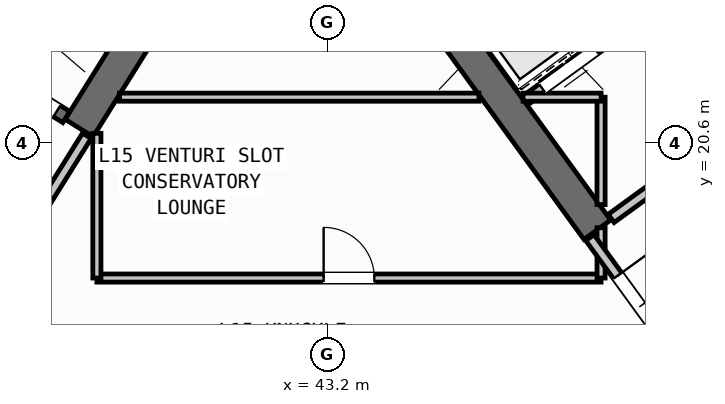
"""IFC4 building model, lengths in metres.
Left out: names, types, materials, properties, quantities, classifications, styles, units other than length and angle.
Written with IfcOpenShell. Run it as: python <this file> out.ifc"""

import sys

from ifc_helpers import new_model, si_unit, direction, frame, frame_2d, origin, place, context, subcontext, project, spatial, rectangle, extrude, source, transform, mapped, element, fill, save


model = new_model("IFC4")
c1 = context("Model", 3, precision=1e-05, world=origin(), true_north=direction((0.0, 1.0)))
c2 = subcontext(c1, "Body", "Model", "MODEL_VIEW")
j1 = project(units=[si_unit("LENGTHUNIT", "METRE"), si_unit("PLANEANGLEUNIT", "RADIAN")], contexts=[c1])
p1 = place(None, origin())
s1 = spatial("IfcSite", under=j1, at=p1, CompositionType="ELEMENT")
p2 = place(p1, origin())
s2 = spatial("IfcBuilding", under=s1, at=p2, CompositionType="ELEMENT")
p3 = place(p2, frame((0.0, 0.0, 60.0)))
s3 = spatial("IfcBuildingStorey", under=s2, at=p3, CompositionType="ELEMENT", Elevation=60.0)
p4 = place(p3, frame((40.168, 23.88, 0.0), z_axis=(0.0, 0.0, 1.0), x_axis=(-0.529893103397, -0.8480644427, 0.0)))
e1 = element("IfcWall", 1, at=p4, inside=s3, PredefinedType="SHEAR", context=c2, shape_type="SweptSolid", body=[
    extrude(rectangle(XDim=3.525, YDim=0.65, at=frame_2d((1.763, 0.0))), origin(), (0.0, 0.0, 1.0), 3.35),
])
p5 = place(p3, frame((48.526, 18.884, 0.0), z_axis=(0.0, 0.0, 1.0), x_axis=(-0.58777996584, 0.809020835181, 0.0)))
e2 = element("IfcWall", 2, at=p5, inside=s3, PredefinedType="SHEAR", context=c2, shape_type="SweptSolid", body=[
    extrude(rectangle(XDim=6.375, YDim=0.65, at=frame_2d((3.188, 0.0))), origin(), (0.0, 0.0, 1.0), 3.35),
])
p6 = place(p3, frame((38.046, 21.108, 0.0), z_axis=(0.0, 0.0, 1.0), x_axis=(-0.848054434086, 0.529909121291, 0.0)))
e3 = element("IfcWall", 3, at=p6, inside=s3, PredefinedType="SHEAR", context=c2, shape_type="SweptSolid", body=[
    extrude(rectangle(XDim=7.33, YDim=0.26, at=frame_2d((3.665, 0.0))), origin(), (0.0, 0.0, 1.0), 3.35),
])
p7 = place(p6, frame((0.22, 0.0, 0.0)))
e4 = element("IfcOpeningElement", 4, at=p7, cuts=e3, PredefinedType="OPENING", context=c2, shape_type="SweptSolid", body=[
    extrude(rectangle(XDim=1.1, YDim=2.1, at=frame_2d((0.55, 1.05))), frame((0.0, 0.14, 0.0), z_axis=(0.0, -1.0, 0.0), x_axis=(1.0, 0.0, 0.0)), (0.0, 0.0, 1.0), 0.28),
])
p8 = place(p3, frame((47.106, 21.437, 0.0), z_axis=(0.0, 0.0, 1.0), x_axis=(0.809012514015, 0.58779141893, 0.0)))
e5 = element("IfcWall", 5, at=p8, inside=s3, PredefinedType="STANDARD", context=c2, shape_type="SweptSolid", body=[
    extrude(rectangle(XDim=3.398, YDim=0.2, at=frame_2d((1.699, 0.0))), origin(), (0.0, 0.0, 1.0), 3.34),
])
p9 = place(p8, frame((0.408, 0.0, 0.0)))
e6 = element("IfcOpeningElement", 6, at=p9, cuts=e5, PredefinedType="OPENING", context=c2, shape_type="SweptSolid", body=[
    extrude(rectangle(XDim=1.3, YDim=2.2, at=frame_2d((0.65, 1.1))), frame((0.0, 0.11, 0.0), z_axis=(0.0, -1.0, 0.0), x_axis=(1.0, 0.0, 0.0)), (0.0, 0.0, 1.0), 0.22),
])
p10 = place(p3, frame((48.799, 19.107, 0.0), z_axis=(0.0, 0.0, 1.0), x_axis=(0.809012959416, 0.587790805897, 0.0)))
e7 = element("IfcWall", 7, at=p10, inside=s3, PredefinedType="STANDARD", context=c2, shape_type="SweptSolid", body=[
    extrude(rectangle(XDim=5.718, YDim=0.2, at=frame_2d((2.859, 0.0))), origin(), (0.0, 0.0, 1.0), 3.34),
])
p11 = place(p10, frame((2.498, 0.0, 0.0)))
e8 = element("IfcOpeningElement", 8, at=p11, cuts=e7, PredefinedType="OPENING", context=c2, shape_type="SweptSolid", body=[
    extrude(rectangle(XDim=1.15, YDim=2.1, at=frame_2d((0.575, 1.05))), frame((0.0, 0.11, 0.0), z_axis=(0.0, -1.0, 0.0), x_axis=(1.0, 0.0, 0.0)), (0.0, 0.0, 1.0), 0.22),
])
p12 = place(p3, frame((38.451, 20.737, 0.0), z_axis=(0.0, 0.0, 1.0), x_axis=(-0.529924799939, -0.848044637038, 0.0)))
e9 = element("IfcWall", 9, at=p12, inside=s3, PredefinedType="STANDARD", context=c2, shape_type="SweptSolid", body=[
    extrude(rectangle(XDim=2.96, YDim=0.2, at=frame_2d((1.48, 0.0))), origin(), (0.0, 0.0, 1.0), 3.34),
])
p13 = place(p12, frame((1.46, 0.0, 0.0)))
e10 = element("IfcOpeningElement", 10, at=p13, cuts=e9, PredefinedType="OPENING", context=c2, shape_type="SweptSolid", body=[
    extrude(rectangle(XDim=0.86, YDim=2.05, at=frame_2d((0.43, 1.025))), frame((0.0, 0.11, 0.0), z_axis=(0.0, -1.0, 0.0), x_axis=(1.0, 0.0, 0.0)), (0.0, 0.0, 1.0), 0.22),
])
p14 = place(p3, frame((38.65, 17.93, 0.0), z_axis=(0.0, 0.0, 1.0), x_axis=(1.0, 0.0, 0.0)))
e11 = element("IfcWall", 11, at=p14, inside=s3, PredefinedType="PARTITIONING", context=c2, shape_type="SweptSolid", body=[
    extrude(rectangle(XDim=9.95, YDim=0.16, at=frame_2d((4.975, 0.0))), origin(), (0.0, 0.0, 1.0), 3.34),
])
p15 = place(p14, frame((4.475, 0.0, 0.0)))
e12 = element("IfcOpeningElement", 12, at=p15, cuts=e11, PredefinedType="OPENING", context=c2, shape_type="SweptSolid", body=[
    extrude(rectangle(XDim=1.0, YDim=2.1, at=frame_2d((0.5, 1.05))), frame((0.0, 0.09, 0.0), z_axis=(0.0, -1.0, 0.0), x_axis=(1.0, 0.0, 0.0)), (0.0, 0.0, 1.0), 0.18),
])
p16 = place(p3, frame((38.65, 17.93, 0.0), z_axis=(0.0, 0.0, 1.0), x_axis=(0.0, 1.0, 0.0)))
e13 = element("IfcWall", 13, at=p16, inside=s3, PredefinedType="PARTITIONING", context=c2, shape_type="SweptSolid", body=[
    extrude(rectangle(XDim=2.857, YDim=0.16, at=frame_2d((1.428, 0.0))), origin(), (0.0, 0.0, 1.0), 3.34),
])
p17 = place(p3, frame((48.6, 17.93, 0.0), z_axis=(0.0, 0.0, 1.0), x_axis=(0.0, 1.0, 0.0)))
e14 = element("IfcWall", 14, at=p17, inside=s3, PredefinedType="PARTITIONING", context=c2, shape_type="SweptSolid", body=[
    extrude(rectangle(XDim=0.993, YDim=0.16, at=frame_2d((0.496, 0.0))), origin(), (0.0, 0.0, 1.0), 3.34),
])
p18 = place(p3, frame((48.6, 19.38, 0.0), z_axis=(0.0, 0.0, 1.0), x_axis=(0.0, 1.0, 0.0)))
e15 = element("IfcWall", 15, at=p18, inside=s3, PredefinedType="PARTITIONING", context=c2, shape_type="SweptSolid", body=[
    extrude(rectangle(XDim=2.12, YDim=0.16, at=frame_2d((1.06, 0.0))), origin(), (0.0, 0.0, 1.0), 3.34),
])
p19 = place(p3, frame((39.095, 21.5, 0.0), z_axis=(0.0, 0.0, 1.0), x_axis=(1.0, 0.0, 0.0)))
e16 = element("IfcWall", 16, at=p19, inside=s3, PredefinedType="PARTITIONING", context=c2, shape_type="SweptSolid", body=[
    extrude(rectangle(XDim=7.094, YDim=0.16, at=frame_2d((3.547, 0.0))), origin(), (0.0, 0.0, 1.0), 3.34),
])
p20 = place(p3, frame((47.06, 21.5, 0.0), z_axis=(0.0, 0.0, 1.0), x_axis=(1.0, 0.0, 0.0)))
e17 = element("IfcWall", 17, at=p20, inside=s3, PredefinedType="PARTITIONING", context=c2, shape_type="SweptSolid", body=[
    extrude(rectangle(XDim=1.54, YDim=0.16, at=frame_2d((0.77, 0.0))), origin(), (0.0, 0.0, 1.0), 3.34),
])
p21 = place(p3, frame((50.119, 16.333, 0.0), z_axis=(0.0, 0.0, 1.0), x_axis=(-0.587749856981, 0.809042709391, 0.0)))
e18 = element("IfcWall", 18, at=p21, inside=s3, PredefinedType="STANDARD", context=c2, shape_type="SweptSolid", body=[
    extrude(rectangle(XDim=2.96, YDim=0.2, at=frame_2d((1.48, 0.0))), origin(), (0.0, 0.0, 1.0), 3.34),
])
p22 = place(p21, frame((0.53, 0.0, 0.0)))
e19 = element("IfcOpeningElement", 19, at=p22, cuts=e18, PredefinedType="OPENING", context=c2, shape_type="SweptSolid", body=[
    extrude(rectangle(XDim=1.5, YDim=2.15, at=frame_2d((0.75, 1.075))), frame((0.0, 0.11, 0.0), z_axis=(0.0, -1.0, 0.0), x_axis=(1.0, 0.0, 0.0)), (0.0, 0.0, 1.0), 0.22),
])
m1 = source(origin(), c2, "Body", "SweptSolid", [
    extrude(rectangle(XDim=1.1, YDim=2.1, at=frame_2d((0.55, 1.05))), frame((0.0, 0.025, 0.0), z_axis=(0.0, -1.0, 0.0), x_axis=(1.0, 0.0, 0.0)), (0.0, 0.0, 1.0), 0.05),
])
p23 = place(p7, origin())
e20 = element("IfcDoor", 20, at=p23, inside=s3, OperationType="SINGLE_SWING_RIGHT", PredefinedType="DOOR", context=c2, shape_type="MappedRepresentation", body=[
    mapped(m1, transform((0.0, 0.0, 0.0), scale=1.0)),
])
fill(e4, e20)
m2 = source(origin(), c2, "Body", "SweptSolid", [
    extrude(rectangle(XDim=1.3, YDim=2.2, at=frame_2d((0.65, 1.1))), frame((0.0, 0.025, 0.0), z_axis=(0.0, -1.0, 0.0), x_axis=(1.0, 0.0, 0.0)), (0.0, 0.0, 1.0), 0.05),
])
p24 = place(p9, origin())
e21 = element("IfcDoor", 21, at=p24, inside=s3, OperationType="DOUBLE_DOOR_SLIDING", PredefinedType="DOOR", context=c2, shape_type="MappedRepresentation", body=[
    mapped(m2, transform((0.0, 0.0, 0.0), scale=1.0)),
])
fill(e6, e21)
m3 = source(origin(), c2, "Body", "SweptSolid", [
    extrude(rectangle(XDim=1.0, YDim=2.1, at=frame_2d((0.5, 1.05))), frame((0.0, 0.025, 0.0), z_axis=(0.0, -1.0, 0.0), x_axis=(1.0, 0.0, 0.0)), (0.0, 0.0, 1.0), 0.05),
])
p25 = place(p15, origin())
e22 = element("IfcDoor", 22, at=p25, inside=s3, OperationType="SINGLE_SWING_LEFT", PredefinedType="DOOR", context=c2, shape_type="MappedRepresentation", body=[
    mapped(m3, transform((0.0, 0.0, 0.0), scale=1.0)),
])
fill(e12, e22)
m4 = source(origin(), c2, "Body", "SweptSolid", [
    extrude(rectangle(XDim=1.5, YDim=2.15, at=frame_2d((0.75, 1.075))), frame((0.0, 0.025, 0.0), z_axis=(0.0, -1.0, 0.0), x_axis=(1.0, 0.0, 0.0)), (0.0, 0.0, 1.0), 0.05),
])
p26 = place(p22, frame((1.5, 0.0, 0.0), z_axis=(0.0, 0.0, 1.0), x_axis=(-1.0, 0.0, 0.0)))
e23 = element("IfcDoor", 23, at=p26, inside=s3, OperationType="DOUBLE_DOOR_SINGLE_SWING", PredefinedType="DOOR", context=c2, shape_type="MappedRepresentation", body=[
    mapped(m4, transform((0.0, 0.0, 0.0), scale=1.0)),
])
fill(e19, e23)
save(model, sys.argv[1])
